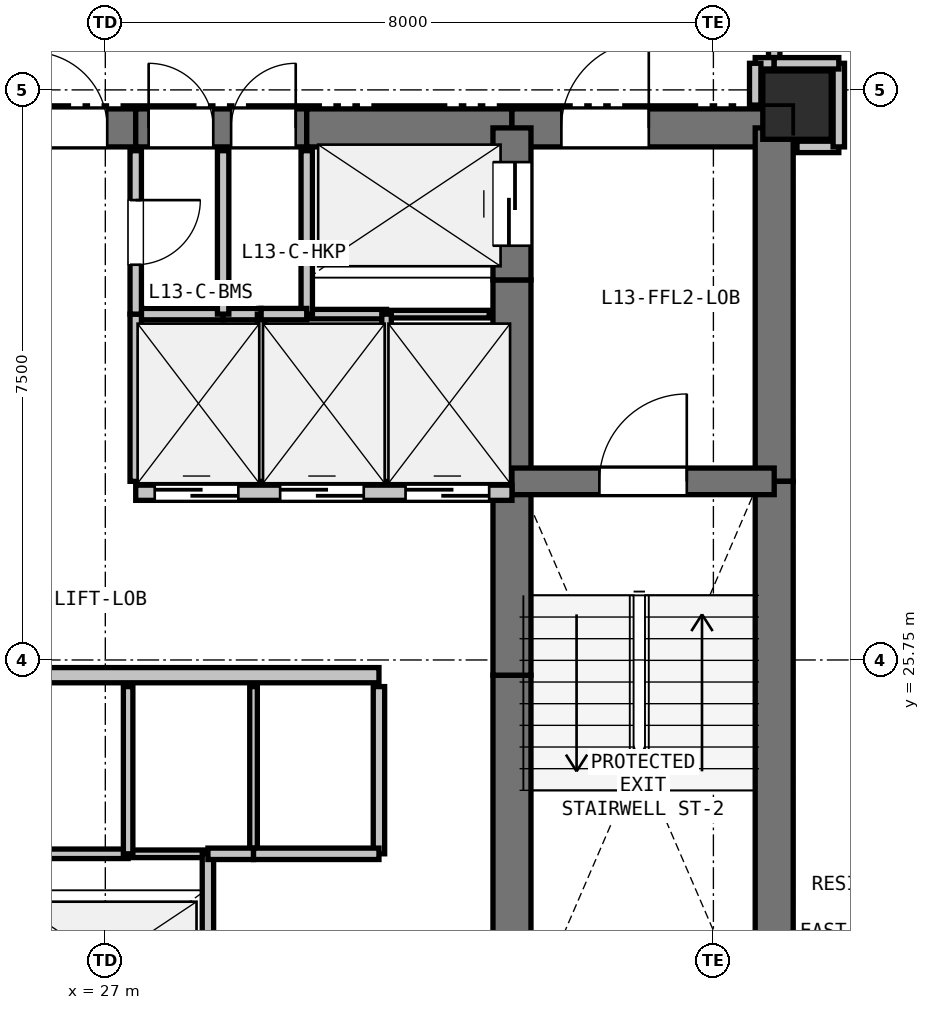
"""IFC4 building model, lengths in metres.
Left out: names, types, materials, properties, quantities, classifications, styles, units other than length and angle.
Written with IfcOpenShell. Run it as: python <this file> out.ifc"""

import sys

from ifc_helpers import new_model, si_unit, direction, frame, frame_2d, origin, origin_2d, place, context, subcontext, project, spatial, rectangle, extrude, element, fill, save


model = new_model("IFC4")
c1 = context("Model", 3, precision=1e-05, world=origin(), true_north=direction((0.0, 1.0)))
c2 = subcontext(c1, "Body", "Model", "MODEL_VIEW")
j1 = project(units=[si_unit("LENGTHUNIT", "METRE"), si_unit("PLANEANGLEUNIT", "RADIAN")], contexts=[c1])
p1 = place(None, origin())
s1 = spatial("IfcSite", under=j1, at=p1, CompositionType="ELEMENT")
p2 = place(p1, origin())
s2 = spatial("IfcBuilding", under=s1, at=p2, CompositionType="ELEMENT")
p3 = place(p2, frame((0.0, 0.0, 48.9)))
s3 = spatial("IfcBuildingStorey", under=s2, at=p3, CompositionType="ELEMENT", Elevation=48.9)
p4 = place(p3, frame((36.1, 33.05, 0.0), z_axis=(0.0, 0.0, 1.0), x_axis=(1.0, 0.0, 0.0)))
e1 = element("IfcColumn", 1, at=p4, inside=s3, PredefinedType="COLUMN", context=c2, shape_type="SweptSolid", body=[
    extrude(rectangle(XDim=0.9, YDim=0.9, at=origin_2d()), origin(), (0.0, 0.0, 1.0), 3.3),
])
p5 = place(p3, frame((25.65, 32.75, 0.0), z_axis=(0.0, 0.0, 1.0), x_axis=(1.0, 0.0, 0.0)))
e2 = element("IfcWall", 2, at=p5, inside=s3, PredefinedType="SHEAR", context=c2, shape_type="SweptSolid", body=[
    extrude(rectangle(XDim=1.75, YDim=0.5, at=frame_2d((0.875, 0.0))), origin(), (0.0, 0.0, 1.0), 3.04),
])
p6 = place(p5, frame((0.375, 0.0, 0.0)))
e3 = element("IfcOpeningElement", 3, at=p6, cuts=e2, PredefinedType="OPENING", context=c2, shape_type="SweptSolid", body=[
    extrude(rectangle(XDim=1.0, YDim=2.15, at=frame_2d((0.5, 1.075))), frame((0.0, 0.26, 0.0), z_axis=(0.0, -1.0, 0.0), x_axis=(1.0, 0.0, 0.0)), (0.0, 0.0, 1.0), 0.52),
])
p7 = place(p3, frame((27.4, 32.75, 0.0), z_axis=(0.0, 0.0, 1.0), x_axis=(1.0, 0.0, 0.0)))
e4 = element("IfcWall", 4, at=p7, inside=s3, PredefinedType="SHEAR", context=c2, shape_type="SweptSolid", body=[
    extrude(rectangle(XDim=2.25, YDim=0.5, at=frame_2d((1.125, 0.0))), origin(), (0.0, 0.0, 1.0), 3.04),
])
p8 = place(p7, frame((0.17, 0.0, 0.0)))
e5 = element("IfcOpeningElement", 5, at=p8, cuts=e4, PredefinedType="OPENING", context=c2, shape_type="SweptSolid", body=[
    extrude(rectangle(XDim=0.85, YDim=2.1, at=frame_2d((0.425, 1.05))), frame((0.0, 0.26, 0.0), z_axis=(0.0, -1.0, 0.0), x_axis=(1.0, 0.0, 0.0)), (0.0, 0.0, 1.0), 0.52),
])
p9 = place(p7, frame((1.255, 0.0, 0.0)))
e6 = element("IfcOpeningElement", 6, at=p9, cuts=e4, PredefinedType="OPENING", context=c2, shape_type="SweptSolid", body=[
    extrude(rectangle(XDim=0.85, YDim=2.1, at=frame_2d((0.425, 1.05))), frame((0.0, 0.26, 0.0), z_axis=(0.0, -1.0, 0.0), x_axis=(1.0, 0.0, 0.0)), (0.0, 0.0, 1.0), 0.52),
])
p10 = place(p3, frame((29.65, 32.75, 0.0), z_axis=(0.0, 0.0, 1.0), x_axis=(1.0, 0.0, 0.0)))
e7 = element("IfcWall", 7, at=p10, inside=s3, PredefinedType="SHEAR", context=c2, shape_type="SweptSolid", body=[
    extrude(rectangle(XDim=2.7, YDim=0.5, at=frame_2d((1.35, 0.0))), origin(), (0.0, 0.0, 1.0), 3.04),
])
p11 = place(p3, frame((32.35, 32.75, 0.0), z_axis=(0.0, 0.0, 1.0), x_axis=(1.0, 0.0, 0.0)))
e8 = element("IfcWall", 8, at=p11, inside=s3, PredefinedType="SHEAR", context=c2, shape_type="SweptSolid", body=[
    extrude(rectangle(XDim=3.45, YDim=0.5, at=frame_2d((1.725, 0.0))), origin(), (0.0, 0.0, 1.0), 3.04),
])
p12 = place(p11, frame((0.65, 0.0, 0.0)))
e9 = element("IfcOpeningElement", 9, at=p12, cuts=e8, PredefinedType="OPENING", context=c2, shape_type="SweptSolid", body=[
    extrude(rectangle(XDim=1.15, YDim=2.15, at=frame_2d((0.575, 1.075))), frame((0.0, 0.26, 0.0), z_axis=(0.0, -1.0, 0.0), x_axis=(1.0, 0.0, 0.0)), (0.0, 0.0, 1.0), 0.52),
])
p13 = place(p3, frame((35.8, 32.75, 0.0), z_axis=(0.0, 0.0, 1.0), x_axis=(0.0, -1.0, 0.0)))
e10 = element("IfcWall", 10, at=p13, inside=s3, PredefinedType="SHEAR", context=c2, shape_type="SweptSolid", body=[
    extrude(rectangle(XDim=4.65, YDim=0.5, at=frame_2d((2.325, 0.0))), origin(), (0.0, 0.0, 1.0), 3.04),
])
p14 = place(p3, frame((35.8, 28.1, 0.0), z_axis=(0.0, 0.0, 1.0), x_axis=(0.0, -1.0, 0.0)))
e11 = element("IfcWall", 11, at=p14, inside=s3, PredefinedType="SHEAR", context=c2, shape_type="SweptSolid", body=[
    extrude(rectangle(XDim=7.35, YDim=0.5, at=frame_2d((3.675, 0.0))), origin(), (0.0, 0.0, 1.0), 3.04),
])
p15 = place(p3, frame((32.35, 20.75, 0.0), z_axis=(0.0, 0.0, 1.0), x_axis=(0.0, 1.0, 0.0)))
e12 = element("IfcWall", 12, at=p15, inside=s3, PredefinedType="SHEAR", context=c2, shape_type="SweptSolid", body=[
    extrude(rectangle(XDim=4.8, YDim=0.5, at=frame_2d((2.4, 0.0))), origin(), (0.0, 0.0, 1.0), 3.04),
])
p16 = place(p3, frame((32.35, 25.55, 0.0), z_axis=(0.0, 0.0, 1.0), x_axis=(0.0, 1.0, 0.0)))
e13 = element("IfcWall", 13, at=p16, inside=s3, PredefinedType="SHEAR", context=c2, shape_type="SweptSolid", body=[
    extrude(rectangle(XDim=2.4, YDim=0.5, at=frame_2d((1.2, 0.0))), origin(), (0.0, 0.0, 1.0), 3.04),
])
p17 = place(p3, frame((32.35, 27.95, 0.0), z_axis=(0.0, 0.0, 1.0), x_axis=(0.0, 1.0, 0.0)))
e14 = element("IfcWall", 14, at=p17, inside=s3, PredefinedType="SHEAR", context=c2, shape_type="SweptSolid", body=[
    extrude(rectangle(XDim=2.8, YDim=0.5, at=frame_2d((1.4, 0.0))), origin(), (0.0, 0.0, 1.0), 3.04),
])
p18 = place(p3, frame((32.35, 30.75, 0.0), z_axis=(0.0, 0.0, 1.0), x_axis=(0.0, 1.0, 0.0)))
e15 = element("IfcWall", 15, at=p18, inside=s3, PredefinedType="SHEAR", context=c2, shape_type="SweptSolid", body=[
    extrude(rectangle(XDim=2.0, YDim=0.5, at=frame_2d((1.0, 0.0))), origin(), (0.0, 0.0, 1.0), 3.04),
])
p19 = place(p18, frame((0.45, 0.0, 0.0)))
e16 = element("IfcOpeningElement", 16, at=p19, cuts=e15, PredefinedType="OPENING", context=c2, shape_type="SweptSolid", body=[
    extrude(rectangle(XDim=1.1, YDim=2.15, at=frame_2d((0.55, 1.075))), frame((0.0, 0.26, 0.0), z_axis=(0.0, -1.0, 0.0), x_axis=(1.0, 0.0, 0.0)), (0.0, 0.0, 1.0), 0.52),
])
p20 = place(p3, frame((32.35, 28.1, 0.0), z_axis=(0.0, 0.0, 1.0), x_axis=(1.0, 0.0, 0.0)))
e17 = element("IfcWall", 17, at=p20, inside=s3, PredefinedType="SHEAR", context=c2, shape_type="SweptSolid", body=[
    extrude(rectangle(XDim=3.45, YDim=0.35, at=frame_2d((1.725, 0.0))), origin(), (0.0, 0.0, 1.0), 3.04),
])
p21 = place(p20, frame((1.15, 0.0, 0.0)))
e18 = element("IfcOpeningElement", 18, at=p21, cuts=e17, PredefinedType="OPENING", context=c2, shape_type="SweptSolid", body=[
    extrude(rectangle(XDim=1.15, YDim=2.15, at=frame_2d((0.575, 1.075))), frame((0.0, 0.185, 0.0), z_axis=(0.0, -1.0, 0.0), x_axis=(1.0, 0.0, 0.0)), (0.0, 0.0, 1.0), 0.37),
])
p22 = place(p3, frame((25.65, 25.55, 0.0), z_axis=(0.0, 0.0, 1.0), x_axis=(1.0, 0.0, 0.0)))
e19 = element("IfcWall", 19, at=p22, inside=s3, PredefinedType="PARTITIONING", context=c2, shape_type="SweptSolid", body=[
    extrude(rectangle(XDim=4.95, YDim=0.2, at=frame_2d((2.475, 0.0))), origin(), (0.0, 0.0, 1.0), 3.04),
])
p23 = place(p3, frame((27.4, 27.95, 0.0), z_axis=(0.0, 0.0, 1.0), x_axis=(1.0, 0.0, 0.0)))
e20 = element("IfcWall", 20, at=p23, inside=s3, PredefinedType="PARTITIONING", context=c2, shape_type="SweptSolid", body=[
    extrude(rectangle(XDim=4.95, YDim=0.2, at=frame_2d((2.475, 0.0))), origin(), (0.0, 0.0, 1.0), 3.04),
])
p24 = place(p23, frame((0.25, 0.0, 0.0)))
e21 = element("IfcOpeningElement", 21, at=p24, cuts=e20, PredefinedType="OPENING", context=c2, shape_type="SweptSolid", body=[
    extrude(rectangle(XDim=1.1, YDim=2.15, at=frame_2d((0.55, 1.075))), frame((0.0, 0.11, 0.0), z_axis=(0.0, -1.0, 0.0), x_axis=(1.0, 0.0, 0.0)), (0.0, 0.0, 1.0), 0.22),
])
p25 = place(p23, frame((1.9, 0.0, 0.0)))
e22 = element("IfcOpeningElement", 22, at=p25, cuts=e20, PredefinedType="OPENING", context=c2, shape_type="SweptSolid", body=[
    extrude(rectangle(XDim=1.1, YDim=2.15, at=frame_2d((0.55, 1.075))), frame((0.0, 0.11, 0.0), z_axis=(0.0, -1.0, 0.0), x_axis=(1.0, 0.0, 0.0)), (0.0, 0.0, 1.0), 0.22),
])
p26 = place(p23, frame((3.55, 0.0, 0.0)))
e23 = element("IfcOpeningElement", 23, at=p26, cuts=e20, PredefinedType="OPENING", context=c2, shape_type="SweptSolid", body=[
    extrude(rectangle(XDim=1.1, YDim=2.15, at=frame_2d((0.55, 1.075))), frame((0.0, 0.11, 0.0), z_axis=(0.0, -1.0, 0.0), x_axis=(1.0, 0.0, 0.0)), (0.0, 0.0, 1.0), 0.22),
])
p27 = place(p3, frame((25.95, 23.2, 0.0), z_axis=(0.0, 0.0, 1.0), x_axis=(1.0, 0.0, 0.0)))
e24 = element("IfcWall", 24, at=p27, inside=s3, PredefinedType="PARTITIONING", context=c2, shape_type="SweptSolid", body=[
    extrude(rectangle(XDim=1.35, YDim=0.125, at=frame_2d((0.675, 0.0))), origin(), (0.0, 0.0, 1.0), 3.04),
])
p28 = place(p3, frame((27.3, 23.2, 0.0), z_axis=(0.0, 0.0, 1.0), x_axis=(1.0, 0.0, 0.0)))
e25 = element("IfcWall", 25, at=p28, inside=s3, PredefinedType="PARTITIONING", context=c2, shape_type="SweptSolid", body=[
    extrude(rectangle(XDim=1.05, YDim=0.1, at=frame_2d((0.525, 0.0))), origin(), (0.0, 0.0, 1.0), 3.04),
])
p29 = place(p3, frame((28.35, 23.2, 0.0), z_axis=(0.0, 0.0, 1.0), x_axis=(0.0, -1.0, 0.0)))
e26 = element("IfcWall", 26, at=p29, inside=s3, PredefinedType="PARTITIONING", context=c2, shape_type="SweptSolid", body=[
    extrude(rectangle(XDim=2.15, YDim=0.15, at=frame_2d((1.075, 0.0))), origin(), (0.0, 0.0, 1.0), 3.04),
])
p30 = place(p3, frame((32.05, 30.3, 0.0), z_axis=(0.0, 0.0, 1.0), x_axis=(-1.0, 0.0, 0.0)))
e27 = element("IfcWall", 27, at=p30, inside=s3, PredefinedType="PARTITIONING", context=c2, shape_type="SweptSolid", body=[
    extrude(rectangle(XDim=1.35, YDim=0.1, at=frame_2d((0.675, 0.0))), origin(), (0.0, 0.0, 1.0), 3.04),
])
p31 = place(p3, frame((30.7, 30.3, 0.0), z_axis=(0.0, 0.0, 1.0), x_axis=(-1.0, 0.0, 0.0)))
e28 = element("IfcWall", 28, at=p31, inside=s3, PredefinedType="PARTITIONING", context=c2, shape_type="SweptSolid", body=[
    extrude(rectangle(XDim=1.05, YDim=0.125, at=frame_2d((0.525, 0.0))), origin(), (0.0, 0.0, 1.0), 3.04),
])
p32 = place(p3, frame((29.65, 30.3, 0.0), z_axis=(0.0, 0.0, 1.0), x_axis=(0.0, 1.0, 0.0)))
e29 = element("IfcWall", 29, at=p32, inside=s3, PredefinedType="PARTITIONING", context=c2, shape_type="SweptSolid", body=[
    extrude(rectangle(XDim=2.15, YDim=0.15, at=frame_2d((1.075, 0.0))), origin(), (0.0, 0.0, 1.0), 3.04),
])
p33 = place(p3, frame((27.3, 25.4, 0.0), z_axis=(0.0, 0.0, 1.0), x_axis=(0.0, -1.0, 0.0)))
e30 = element("IfcWall", 30, at=p33, inside=s3, PredefinedType="PARTITIONING", context=c2, shape_type="SweptSolid", body=[
    extrude(rectangle(XDim=2.2, YDim=0.125, at=frame_2d((1.1, 0.0))), origin(), (0.0, 0.0, 1.0), 3.04),
])
p34 = place(p3, frame((28.95, 25.4, 0.0), z_axis=(0.0, 0.0, 1.0), x_axis=(0.0, -1.0, 0.0)))
e31 = element("IfcWall", 31, at=p34, inside=s3, PredefinedType="PARTITIONING", context=c2, shape_type="SweptSolid", body=[
    extrude(rectangle(XDim=2.2, YDim=0.1, at=frame_2d((1.1, 0.0))), origin(), (0.0, 0.0, 1.0), 3.04),
])
p35 = place(p3, frame((28.95, 23.2, 0.0), z_axis=(0.0, 0.0, 1.0), x_axis=(-1.0, 0.0, 0.0)))
e32 = element("IfcWall", 32, at=p35, inside=s3, PredefinedType="PARTITIONING", context=c2, shape_type="SweptSolid", body=[
    extrude(rectangle(XDim=0.6, YDim=0.15, at=frame_2d((0.3, 0.0))), origin(), (0.0, 0.0, 1.0), 3.04),
])
p36 = place(p3, frame((30.6, 25.4, 0.0), z_axis=(0.0, 0.0, 1.0), x_axis=(0.0, -1.0, 0.0)))
e33 = element("IfcWall", 33, at=p36, inside=s3, PredefinedType="PARTITIONING", context=c2, shape_type="SweptSolid", body=[
    extrude(rectangle(XDim=2.2, YDim=0.15, at=frame_2d((1.1, 0.0))), origin(), (0.0, 0.0, 1.0), 3.04),
])
p37 = place(p3, frame((30.6, 23.2, 0.0), z_axis=(0.0, 0.0, 1.0), x_axis=(-1.0, 0.0, 0.0)))
e34 = element("IfcWall", 34, at=p37, inside=s3, PredefinedType="PARTITIONING", context=c2, shape_type="SweptSolid", body=[
    extrude(rectangle(XDim=1.65, YDim=0.15, at=frame_2d((0.825, 0.0))), origin(), (0.0, 0.0, 1.0), 3.04),
])
p38 = place(p3, frame((27.4, 30.3, 0.0), z_axis=(0.0, 0.0, 1.0), x_axis=(1.0, 0.0, 0.0)))
e35 = element("IfcWall", 35, at=p38, inside=s3, PredefinedType="PARTITIONING", context=c2, shape_type="SweptSolid", body=[
    extrude(rectangle(XDim=1.15, YDim=0.15, at=frame_2d((0.575, 0.0))), origin(), (0.0, 0.0, 1.0), 3.04),
])
p39 = place(p3, frame((28.55, 30.3, 0.0), z_axis=(0.0, 0.0, 1.0), x_axis=(1.0, 0.0, 0.0)))
e36 = element("IfcWall", 36, at=p39, inside=s3, PredefinedType="PARTITIONING", context=c2, shape_type="SweptSolid", body=[
    extrude(rectangle(XDim=0.5, YDim=0.15, at=frame_2d((0.25, 0.0))), origin(), (0.0, 0.0, 1.0), 3.04),
])
p40 = place(p3, frame((29.05, 30.3, 0.0), z_axis=(0.0, 0.0, 1.0), x_axis=(0.0, -1.0, 0.0)))
e37 = element("IfcWall", 37, at=p40, inside=s3, PredefinedType="PARTITIONING", context=c2, shape_type="SweptSolid", body=[
    extrude(rectangle(XDim=2.2, YDim=0.1, at=frame_2d((1.1, 0.0))), origin(), (0.0, 0.0, 1.0), 3.04),
])
p41 = place(p3, frame((27.4, 28.1, 0.0), z_axis=(0.0, 0.0, 1.0), x_axis=(0.0, 1.0, 0.0)))
e38 = element("IfcWall", 38, at=p41, inside=s3, PredefinedType="PARTITIONING", context=c2, shape_type="SweptSolid", body=[
    extrude(rectangle(XDim=2.2, YDim=0.15, at=frame_2d((1.1, 0.0))), origin(), (0.0, 0.0, 1.0), 3.04),
])
p42 = place(p3, frame((29.05, 30.3, 0.0), z_axis=(0.0, 0.0, 1.0), x_axis=(1.0, 0.0, 0.0)))
e39 = element("IfcWall", 39, at=p42, inside=s3, PredefinedType="PARTITIONING", context=c2, shape_type="SweptSolid", body=[
    extrude(rectangle(XDim=0.6, YDim=0.15, at=frame_2d((0.3, 0.0))), origin(), (0.0, 0.0, 1.0), 3.04),
])
p43 = place(p3, frame((30.7, 30.3, 0.0), z_axis=(0.0, 0.0, 1.0), x_axis=(0.0, -1.0, 0.0)))
e40 = element("IfcWall", 40, at=p43, inside=s3, PredefinedType="PARTITIONING", context=c2, shape_type="SweptSolid", body=[
    extrude(rectangle(XDim=2.2, YDim=0.125, at=frame_2d((1.1, 0.0))), origin(), (0.0, 0.0, 1.0), 3.04),
])
p44 = place(p3, frame((27.4, 32.45, 0.0), z_axis=(0.0, 0.0, 1.0), x_axis=(0.0, -1.0, 0.0)))
e41 = element("IfcWall", 41, at=p44, inside=s3, PredefinedType="PARTITIONING", context=c2, shape_type="SweptSolid", body=[
    extrude(rectangle(XDim=2.15, YDim=0.15, at=frame_2d((1.075, 0.0))), origin(), (0.0, 0.0, 1.0), 3.04),
])
p45 = place(p44, frame((0.65, 0.0, 0.0)))
e42 = element("IfcOpeningElement", 42, at=p45, cuts=e41, PredefinedType="OPENING", context=c2, shape_type="SweptSolid", body=[
    extrude(rectangle(XDim=0.85, YDim=2.1, at=frame_2d((0.425, 1.05))), frame((0.0, 0.085, 0.0), z_axis=(0.0, -1.0, 0.0), x_axis=(1.0, 0.0, 0.0)), (0.0, 0.0, 1.0), 0.17),
])
p46 = place(p3, frame((35.8, 35.35, 0.0), z_axis=(0.0, 0.0, 1.0), x_axis=(0.0, -1.0, 0.0)))
e43 = element("IfcWall", 43, at=p46, inside=s3, PredefinedType="PARTITIONING", context=c2, shape_type="SweptSolid", body=[
    extrude(rectangle(XDim=1.75, YDim=0.15, at=frame_2d((0.875, 0.0))), origin(), (0.0, 0.0, 1.0), 3.04),
])
p47 = place(p46, frame((0.375, 0.0, 0.0)))
e44 = element("IfcOpeningElement", 44, at=p47, cuts=e43, PredefinedType="OPENING", context=c2, shape_type="SweptSolid", body=[
    extrude(rectangle(XDim=1.0, YDim=2.15, at=frame_2d((0.5, 1.075))), frame((0.0, 0.085, 0.0), z_axis=(0.0, -1.0, 0.0), x_axis=(1.0, 0.0, 0.0)), (0.0, 0.0, 1.0), 0.17),
])
p48 = place(p3, frame((35.8, 33.6, 0.0), z_axis=(0.0, 0.0, 1.0), x_axis=(-1.0, 0.0, 0.0)))
e45 = element("IfcWall", 45, at=p48, inside=s3, PredefinedType="PARTITIONING", context=c2, shape_type="SweptSolid", body=[
    extrude(rectangle(XDim=0.25, YDim=0.15, at=frame_2d((0.125, 0.0))), origin(), (0.0, 0.0, 1.0), 3.04),
])
p49 = place(p3, frame((35.55, 33.6, 0.0), z_axis=(0.0, 0.0, 1.0), x_axis=(0.0, -1.0, 0.0)))
e46 = element("IfcWall", 46, at=p49, inside=s3, PredefinedType="PARTITIONING", context=c2, shape_type="SweptSolid", body=[
    extrude(rectangle(XDim=0.55, YDim=0.15, at=frame_2d((0.275, 0.0))), origin(), (0.0, 0.0, 1.0), 2.488),
])
p50 = place(p3, frame((36.1, 32.5, 0.0), z_axis=(0.0, 0.0, 1.0), x_axis=(1.0, 0.0, 0.0)))
e47 = element("IfcWall", 47, at=p50, inside=s3, PredefinedType="PARTITIONING", context=c2, shape_type="SweptSolid", body=[
    extrude(rectangle(XDim=0.55, YDim=0.15, at=frame_2d((0.275, 0.0))), origin(), (0.0, 0.0, 1.0), 2.488),
])
p51 = place(p3, frame((36.65, 32.5, 0.0), z_axis=(0.0, 0.0, 1.0), x_axis=(0.0, 1.0, 0.0)))
e48 = element("IfcWall", 48, at=p51, inside=s3, PredefinedType="PARTITIONING", context=c2, shape_type="SweptSolid", body=[
    extrude(rectangle(XDim=1.1, YDim=0.15, at=frame_2d((0.55, 0.0))), origin(), (0.0, 0.0, 1.0), 2.338),
])
p52 = place(p3, frame((36.65, 33.6, 0.0), z_axis=(0.0, 0.0, 1.0), x_axis=(-1.0, 0.0, 0.0)))
e49 = element("IfcWall", 49, at=p52, inside=s3, PredefinedType="PARTITIONING", context=c2, shape_type="SweptSolid", body=[
    extrude(rectangle(XDim=0.85, YDim=0.15, at=frame_2d((0.425, 0.0))), origin(), (0.0, 0.0, 1.0), 2.338),
])
p53 = place(p3, frame((28.55, 32.45, 0.0), z_axis=(0.0, 0.0, 1.0), x_axis=(0.0, -1.0, 0.0)))
e50 = element("IfcWall", 50, at=p53, inside=s3, PredefinedType="PARTITIONING", context=c2, shape_type="SweptSolid", body=[
    extrude(rectangle(XDim=2.15, YDim=0.15, at=frame_2d((1.075, 0.0))), origin(), (0.0, 0.0, 1.0), 3.04),
])
p54 = place(p24, origin())
e51 = element("IfcDoor", 51, at=p54, inside=s3, OperationType="SLIDING_TO_LEFT", PredefinedType="DOOR", context=c2, shape_type="SweptSolid", body=[
    extrude(rectangle(XDim=1.1, YDim=2.15, at=frame_2d((0.55, 1.075))), frame((0.0, 0.025, 0.0), z_axis=(0.0, -1.0, 0.0), x_axis=(1.0, 0.0, 0.0)), (0.0, 0.0, 1.0), 0.05),
])
fill(e21, e51)
p55 = place(p25, origin())
e52 = element("IfcDoor", 52, at=p55, inside=s3, OperationType="SLIDING_TO_LEFT", PredefinedType="DOOR", context=c2, shape_type="SweptSolid", body=[
    extrude(rectangle(XDim=1.1, YDim=2.15, at=frame_2d((0.55, 1.075))), frame((0.0, 0.025, 0.0), z_axis=(0.0, -1.0, 0.0), x_axis=(1.0, 0.0, 0.0)), (0.0, 0.0, 1.0), 0.05),
])
fill(e22, e52)
p56 = place(p26, origin())
e53 = element("IfcDoor", 53, at=p56, inside=s3, OperationType="SLIDING_TO_LEFT", PredefinedType="DOOR", context=c2, shape_type="SweptSolid", body=[
    extrude(rectangle(XDim=1.1, YDim=2.15, at=frame_2d((0.55, 1.075))), frame((0.0, 0.025, 0.0), z_axis=(0.0, -1.0, 0.0), x_axis=(1.0, 0.0, 0.0)), (0.0, 0.0, 1.0), 0.05),
])
fill(e23, e53)
p57 = place(p6, origin())
e54 = element("IfcDoor", 54, at=p57, inside=s3, OperationType="SINGLE_SWING_LEFT", PredefinedType="DOOR", context=c2, shape_type="SweptSolid", body=[
    extrude(rectangle(XDim=1.0, YDim=2.15, at=frame_2d((0.5, 1.075))), frame((0.0, 0.025, 0.0), z_axis=(0.0, -1.0, 0.0), x_axis=(1.0, 0.0, 0.0)), (0.0, 0.0, 1.0), 0.05),
])
fill(e3, e54)
p58 = place(p19, origin())
e55 = element("IfcDoor", 55, at=p58, inside=s3, OperationType="SLIDING_TO_LEFT", PredefinedType="DOOR", context=c2, shape_type="SweptSolid", body=[
    extrude(rectangle(XDim=1.1, YDim=2.15, at=frame_2d((0.55, 1.075))), frame((0.0, 0.025, 0.0), z_axis=(0.0, -1.0, 0.0), x_axis=(1.0, 0.0, 0.0)), (0.0, 0.0, 1.0), 0.05),
])
fill(e16, e55)
p59 = place(p21, origin())
e56 = element("IfcDoor", 56, at=p59, inside=s3, OperationType="SINGLE_SWING_RIGHT", PredefinedType="DOOR", context=c2, shape_type="SweptSolid", body=[
    extrude(rectangle(XDim=1.15, YDim=2.15, at=frame_2d((0.575, 1.075))), frame((0.0, 0.025, 0.0), z_axis=(0.0, -1.0, 0.0), x_axis=(1.0, 0.0, 0.0)), (0.0, 0.0, 1.0), 0.05),
])
fill(e18, e56)
p60 = place(p12, origin())
e57 = element("IfcDoor", 57, at=p60, inside=s3, OperationType="SINGLE_SWING_RIGHT", PredefinedType="DOOR", context=c2, shape_type="SweptSolid", body=[
    extrude(rectangle(XDim=1.15, YDim=2.15, at=frame_2d((0.575, 1.075))), frame((0.0, 0.025, 0.0), z_axis=(0.0, -1.0, 0.0), x_axis=(1.0, 0.0, 0.0)), (0.0, 0.0, 1.0), 0.05),
])
fill(e9, e57)
p61 = place(p45, origin())
e58 = element("IfcDoor", 58, at=p61, inside=s3, OperationType="SINGLE_SWING_LEFT", PredefinedType="DOOR", context=c2, shape_type="SweptSolid", body=[
    extrude(rectangle(XDim=0.85, YDim=2.1, at=frame_2d((0.425, 1.05))), frame((0.0, 0.025, 0.0), z_axis=(0.0, -1.0, 0.0), x_axis=(1.0, 0.0, 0.0)), (0.0, 0.0, 1.0), 0.05),
])
fill(e42, e58)
p62 = place(p8, origin())
e59 = element("IfcDoor", 59, at=p62, inside=s3, OperationType="SINGLE_SWING_LEFT", PredefinedType="DOOR", context=c2, shape_type="SweptSolid", body=[
    extrude(rectangle(XDim=0.85, YDim=2.1, at=frame_2d((0.425, 1.05))), frame((0.0, 0.025, 0.0), z_axis=(0.0, -1.0, 0.0), x_axis=(1.0, 0.0, 0.0)), (0.0, 0.0, 1.0), 0.05),
])
fill(e5, e59)
p63 = place(p9, origin())
e60 = element("IfcDoor", 60, at=p63, inside=s3, OperationType="SINGLE_SWING_RIGHT", PredefinedType="DOOR", context=c2, shape_type="SweptSolid", body=[
    extrude(rectangle(XDim=0.85, YDim=2.1, at=frame_2d((0.425, 1.05))), frame((0.0, 0.025, 0.0), z_axis=(0.0, -1.0, 0.0), x_axis=(1.0, 0.0, 0.0)), (0.0, 0.0, 1.0), 0.05),
])
fill(e6, e60)
save(model, sys.argv[1])
